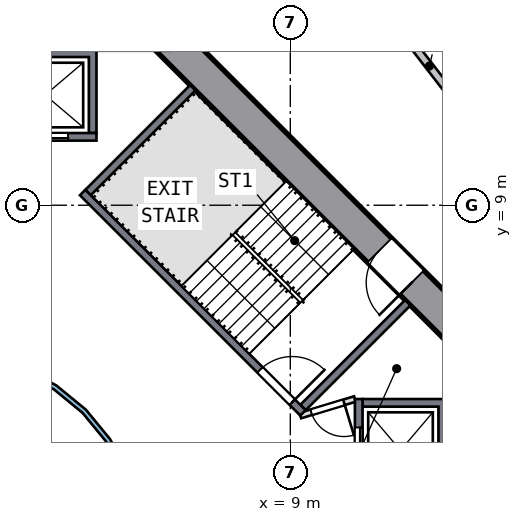
"""IFC4 building model, lengths in metres.
Left out: names, types, materials, properties, quantities, classifications, styles, units other than length and angle.
Written with IfcOpenShell. Run it as: python <this file> out.ifc"""

import sys

from ifc_helpers import new_model, si_unit, direction, frame, frame_2d, origin, place, context, subcontext, project, spatial, polyline, rectangle, outline, extrude, element, fill, save


model = new_model("IFC4")
c1 = context("Model", 3, precision=1e-05, world=origin(), true_north=direction((0.0, 1.0)))
c2 = subcontext(c1, "Body", "Model", "MODEL_VIEW")
j1 = project(units=[si_unit("LENGTHUNIT", "METRE"), si_unit("PLANEANGLEUNIT", "RADIAN")], contexts=[c1])
p1 = place(None, origin())
s1 = spatial("IfcSite", under=j1, at=p1, CompositionType="ELEMENT")
p2 = place(p1, origin())
s2 = spatial("IfcBuilding", under=s1, at=p2, CompositionType="ELEMENT")
p3 = place(p2, frame((0.0, 0.0, 64.5)))
s3 = spatial("IfcBuildingStorey", under=s2, at=p3, CompositionType="ELEMENT", Elevation=64.5)
p4 = place(p3, frame((13.682, 5.481, 0.0), z_axis=(0.0, 0.0, 1.0), x_axis=(-0.707106781, 0.707106781, 0.0)))
e1 = element("IfcWall", 1, at=p4, inside=s3, PredefinedType="SHEAR", context=c2, shape_type="SweptSolid", body=[
    extrude(rectangle(XDim=11.598, YDim=0.9, at=frame_2d((5.799, 0.0))), origin(), (0.0, 0.0, 1.0), 3.5),
])
p5 = place(p4, frame((2.099, 0.0, 0.0)))
e2 = element("IfcOpeningElement", 2, at=p5, cuts=e1, PredefinedType="OPENING", context=c2, shape_type="SweptSolid", body=[
    extrude(rectangle(XDim=1.2, YDim=2.1, at=frame_2d((0.6, 1.05))), frame((0.0, 0.46, 0.0), z_axis=(0.0, -1.0, 0.0), x_axis=(1.0, 0.0, 0.0)), (0.0, 0.0, 1.0), 0.92),
])
p6 = place(p3, origin())
e3 = element("IfcWall", 3, at=p6, inside=s3, PredefinedType="SOLIDWALL", context=c2, shape_type="SweptSolid", body=[
    extrude(outline(polyline([(13.1, 3.9), (13.1, 1.2), (10.9, 1.2), (10.9, 1.4), (12.9, 1.4), (12.9, 3.7), (10.9, 3.7), (10.9, 3.9), (13.1, 3.9)])), origin(), (0.0, 0.0, 1.0), 3.19),
])
p7 = place(p3, frame((10.8, 1.2, 0.0), z_axis=(0.0, 0.0, 1.0), x_axis=(0.0, 1.0, 0.0)))
e4 = element("IfcWall", 4, at=p7, inside=s3, PredefinedType="SOLIDWALL", context=c2, shape_type="SweptSolid", body=[
    extrude(rectangle(XDim=2.7, YDim=0.2, at=frame_2d((1.35, 0.0))), origin(), (0.0, 0.0, 1.0), 3.19),
])
p8 = place(p7, frame((0.75, 0.0, 0.0)))
e5 = element("IfcOpeningElement", 5, at=p8, cuts=e4, PredefinedType="OPENING", context=c2, shape_type="SweptSolid", body=[
    extrude(rectangle(XDim=1.2, YDim=2.1, at=frame_2d((0.6, 1.05))), frame((0.0, 0.11, 0.0), z_axis=(0.0, -1.0, 0.0), x_axis=(1.0, 0.0, 0.0)), (0.0, 0.0, 1.0), 0.22),
])
p9 = place(p3, origin())
e6 = element("IfcWall", 6, at=p9, inside=s3, PredefinedType="SOLIDWALL", context=c2, shape_type="SweptSolid", body=[
    extrude(outline(polyline([(3.9, 13.1), (3.9, 10.9), (3.7, 10.9), (3.7, 12.9), (1.4, 12.9), (1.4, 10.9), (1.2, 10.9), (1.2, 13.1), (3.9, 13.1)])), origin(), (0.0, 0.0, 1.0), 3.19),
])
p10 = place(p3, frame((1.2, 10.8, 0.0), z_axis=(0.0, 0.0, 1.0), x_axis=(1.0, 0.0, 0.0)))
e7 = element("IfcWall", 7, at=p10, inside=s3, PredefinedType="SOLIDWALL", context=c2, shape_type="SweptSolid", body=[
    extrude(rectangle(XDim=2.7, YDim=0.2, at=frame_2d((1.35, 0.0))), origin(), (0.0, 0.0, 1.0), 3.19),
])
p11 = place(p10, frame((0.75, 0.0, 0.0)))
e8 = element("IfcOpeningElement", 8, at=p11, cuts=e7, PredefinedType="OPENING", context=c2, shape_type="SweptSolid", body=[
    extrude(rectangle(XDim=1.2, YDim=2.1, at=frame_2d((0.6, 1.05))), frame((0.0, 0.11, 0.0), z_axis=(0.0, -1.0, 0.0), x_axis=(1.0, 0.0, 0.0)), (0.0, 0.0, 1.0), 0.22),
])
p12 = place(p3, frame((3.535, 9.334, 0.0), z_axis=(0.0, 0.0, 1.0), x_axis=(0.707106781, -0.707106781, 0.0)))
e9 = element("IfcWall", 9, at=p12, inside=s3, PredefinedType="SOLIDWALL", context=c2, shape_type="SweptSolid", body=[
    extrude(rectangle(XDim=8.2, YDim=0.2, at=frame_2d((4.1, 0.0))), origin(), (0.0, 0.0, 1.0), 3.19),
])
p13 = place(p12, frame((6.6, 0.0, 0.0)))
e10 = element("IfcOpeningElement", 10, at=p13, cuts=e9, PredefinedType="OPENING", context=c2, shape_type="SweptSolid", body=[
    extrude(rectangle(XDim=1.2, YDim=2.1, at=frame_2d((0.6, 1.05))), frame((0.0, 0.11, 0.0), z_axis=(0.0, -1.0, 0.0), x_axis=(1.0, 0.0, 0.0)), (0.0, 0.0, 1.0), 0.22),
])
for number, where, z_axis, x_axis in (
    (11, (9.334, 3.677, 0.0), (0.0, 0.0, 1.0), (0.707, 0.707, 0.0)),
    (12, (3.677, 9.334, 0.0), (0.0, 0.0, 1.0), (0.707, 0.707, 0.0)),
):
    element("IfcWall", number, at=place(p3, frame(where, z_axis=z_axis, x_axis=x_axis)), inside=s3, PredefinedType="SOLIDWALL", context=c2, shape_type="SweptSolid", body=[
        extrude(rectangle(XDim=3.9, YDim=0.2, at=frame_2d((1.95, 0.0))), origin(), (0.0, 0.0, 1.0), 3.19),
    ])
p14 = place(p3, frame((10.7, 3.9, 0.0), z_axis=(0.0, 0.0, 1.0), x_axis=(-0.957084567, -0.289808785, 0.0)))
e13 = element("IfcWall", 13, at=p14, inside=s3, PredefinedType="PARTITIONING", context=c2, shape_type="SweptSolid", body=[
    extrude(rectangle(XDim=1.501, YDim=0.15, at=frame_2d((0.75, 0.0))), origin(), (0.0, 0.0, 1.0), 3.19),
])
p15 = place(p14, frame((0.301, 0.0, 0.0)))
e14 = element("IfcOpeningElement", 14, at=p15, cuts=e13, PredefinedType="OPENING", context=c2, shape_type="SweptSolid", body=[
    extrude(rectangle(XDim=0.9, YDim=2.1, at=frame_2d((0.45, 1.05))), frame((0.0, 0.085, 0.0), z_axis=(0.0, -1.0, 0.0), x_axis=(1.0, 0.0, 0.0)), (0.0, 0.0, 1.0), 0.17),
])
p16 = place(p3, origin())
e15 = element("IfcWall", 15, at=p16, inside=s3, PredefinedType="SOLIDWALL", context=c2, shape_type="SweptSolid", body=[
    extrude(outline(polyline([(5.021, -0.999), (4.73, -1.959), (4.257, -2.844), (3.62, -3.62), (2.844, -4.257), (1.959, -4.73), (0.999, -5.021), (0.0, -5.12), (-0.999, -5.021), (-1.959, -4.73), (-2.844, -4.257), (-3.62, -3.62), (-4.257, -2.844), (-4.73, -1.959), (-5.021, -0.999), (-5.12, 0.0), (-5.021, 0.999), (-4.73, 1.959), (-4.257, 2.844), (-3.62, 3.62), (-2.844, 4.257), (-1.959, 4.73), (-0.999, 5.021), (0.0, 5.12), (0.999, 5.021), (1.959, 4.73), (2.844, 4.257), (3.62, 3.62), (4.257, 2.844), (4.73, 1.959), (5.021, 0.999), (5.12, 0.0), (5.021, -0.999)]), holes=[polyline([(4.904, 0.976), (4.619, 1.913), (4.157, 2.778), (3.535, 3.535), (2.778, 4.157), (1.913, 4.619), (0.976, 4.904), (0.0, 5.0), (-0.976, 4.904), (-1.913, 4.619), (-2.778, 4.157), (-3.535, 3.535), (-4.157, 2.778), (-4.619, 1.913), (-4.904, 0.976), (-5.0, 0.0), (-4.904, -0.976), (-4.619, -1.913), (-4.157, -2.778), (-3.535, -3.535), (-2.778, -4.157), (-1.913, -4.619), (-0.976, -4.904), (0.0, -5.0), (0.976, -4.904), (1.913, -4.619), (2.778, -4.157), (3.535, -3.535), (4.157, -2.778), (4.619, -1.913), (4.904, -0.976), (5.0, 0.0), (4.904, 0.976)])]), origin(), (0.0, 0.0, 1.0), 3.19),
])
p17 = place(p3, frame((11.146, 14.62, 0.0), z_axis=(0.0, 0.0, 1.0), x_axis=(0.611244608, -0.791441741, 0.0)))
e16 = element("IfcWall", 16, at=p17, inside=s3, PredefinedType="SOLIDWALL", context=c2, shape_type="SweptSolid", body=[
    extrude(rectangle(XDim=9.316, YDim=0.2, at=frame_2d((4.658, 0.0))), origin(), (0.0, 0.0, 1.0), 3.19),
])
p18 = place(p17, frame((5.15, 0.0, 0.0)))
e17 = element("IfcOpeningElement", 17, at=p18, cuts=e16, PredefinedType="OPENING", context=c2, shape_type="SweptSolid", body=[
    extrude(rectangle(XDim=1.0, YDim=2.1, at=frame_2d((0.5, 1.05))), frame((0.0, 0.11, 0.0), z_axis=(0.0, -1.0, 0.0), x_axis=(1.0, 0.0, 0.0)), (0.0, 0.0, 1.0), 0.22),
])
p19 = place(p8, origin())
e18 = element("IfcDoor", 18, at=p19, inside=s3, OperationType="DOUBLE_DOOR_SLIDING", PredefinedType="DOOR", context=c2, shape_type="SweptSolid", body=[
    extrude(rectangle(XDim=1.2, YDim=2.1, at=frame_2d((0.6, 1.05))), frame((0.0, 0.025, 0.0), z_axis=(0.0, -1.0, 0.0), x_axis=(1.0, 0.0, 0.0)), (0.0, 0.0, 1.0), 0.05),
])
fill(e5, e18)
p20 = place(p11, origin())
e19 = element("IfcDoor", 19, at=p20, inside=s3, OperationType="DOUBLE_DOOR_SLIDING", PredefinedType="DOOR", context=c2, shape_type="SweptSolid", body=[
    extrude(rectangle(XDim=1.2, YDim=2.1, at=frame_2d((0.6, 1.05))), frame((0.0, 0.025, 0.0), z_axis=(0.0, -1.0, 0.0), x_axis=(1.0, 0.0, 0.0)), (0.0, 0.0, 1.0), 0.05),
])
fill(e8, e19)
p21 = place(p13, origin())
e20 = element("IfcDoor", 20, at=p21, inside=s3, OperationType="SINGLE_SWING_RIGHT", PredefinedType="DOOR", context=c2, shape_type="SweptSolid", body=[
    extrude(rectangle(XDim=1.2, YDim=2.1, at=frame_2d((0.6, 1.05))), frame((0.0, 0.025, 0.0), z_axis=(0.0, -1.0, 0.0), x_axis=(1.0, 0.0, 0.0)), (0.0, 0.0, 1.0), 0.05),
])
fill(e10, e20)
p22 = place(p5, origin())
e21 = element("IfcDoor", 21, at=p22, inside=s3, OperationType="SINGLE_SWING_LEFT", PredefinedType="DOOR", context=c2, shape_type="SweptSolid", body=[
    extrude(rectangle(XDim=1.2, YDim=2.1, at=frame_2d((0.6, 1.05))), frame((0.0, 0.025, 0.0), z_axis=(0.0, -1.0, 0.0), x_axis=(1.0, 0.0, 0.0)), (0.0, 0.0, 1.0), 0.05),
])
fill(e2, e21)
p23 = place(p15, origin())
e22 = element("IfcDoor", 22, at=p23, inside=s3, OperationType="SINGLE_SWING_LEFT", PredefinedType="DOOR", context=c2, shape_type="SweptSolid", body=[
    extrude(rectangle(XDim=0.9, YDim=2.1, at=frame_2d((0.45, 1.05))), frame((0.0, 0.025, 0.0), z_axis=(0.0, -1.0, 0.0), x_axis=(1.0, 0.0, 0.0)), (0.0, 0.0, 1.0), 0.05),
])
fill(e14, e22)
save(model, sys.argv[1])
